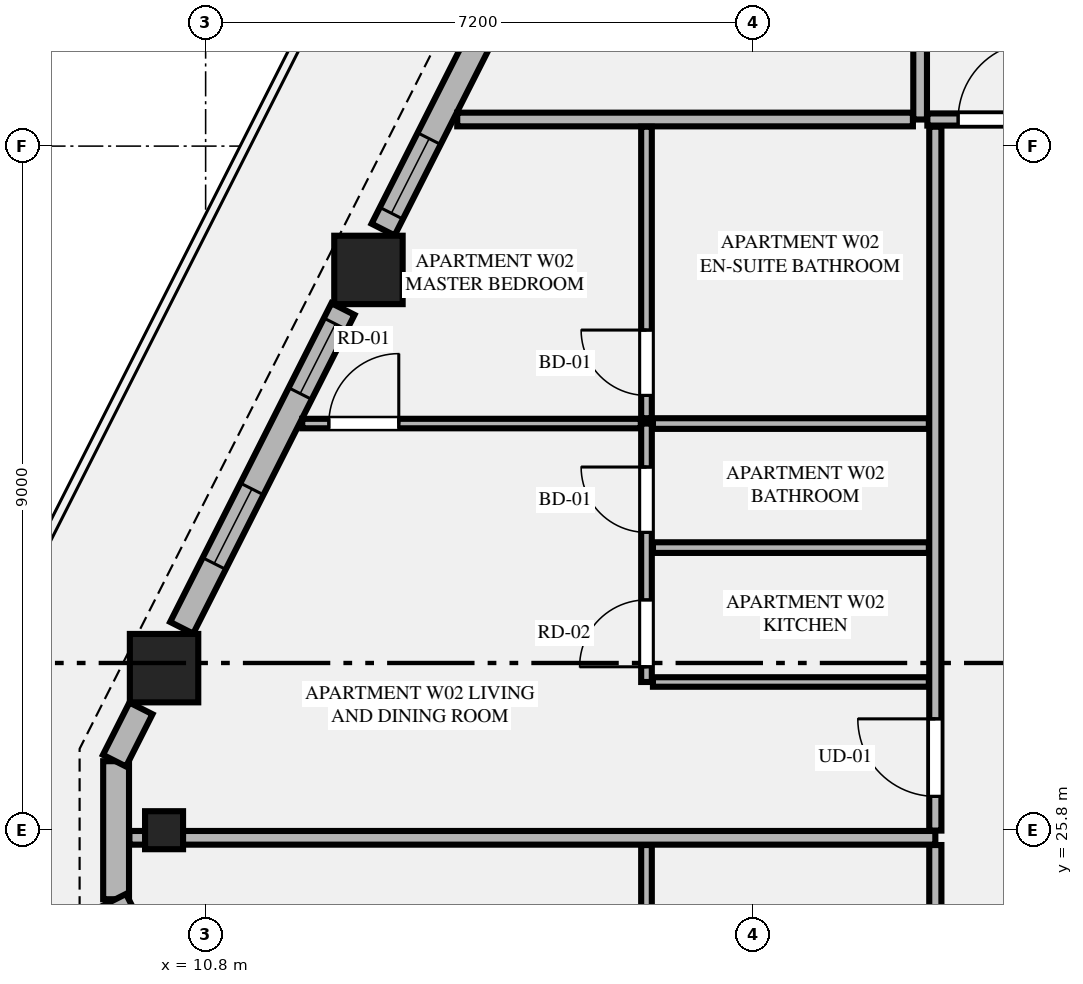
"""IFC4 building model, lengths in metres.
Left out: names, types, materials, properties, quantities, classifications, styles, units other than length and angle.
Written with IfcOpenShell. Run it as: python <this file> out.ifc"""

import sys

from ifc_helpers import new_model, si_unit, direction, frame, frame_2d, origin, origin_2d, place, context, subcontext, project, spatial, rectangle, extrude, element, fill, save


model = new_model("IFC4")
c1 = context("Model", 3, precision=1e-05, world=origin(), true_north=direction((0.0, 1.0)))
c2 = subcontext(c1, "Body", "Model", "MODEL_VIEW")
j1 = project(units=[si_unit("LENGTHUNIT", "METRE"), si_unit("PLANEANGLEUNIT", "RADIAN")], contexts=[c1])
p1 = place(None, origin())
s1 = spatial("IfcSite", under=j1, at=p1, CompositionType="ELEMENT")
p2 = place(p1, origin())
s2 = spatial("IfcBuilding", under=s1, at=p2, CompositionType="ELEMENT")
p3 = place(p2, frame((0.0, 0.0, 171.9)))
s3 = spatial("IfcBuildingStorey", under=s2, at=p3, CompositionType="ELEMENT", Elevation=171.9)
for number, where, z_axis, x_axis in (
    (1, (12.942, 33.171, 0.0), (0.0, 0.0, 1.0), (1.0, 0.0, 0.0)),
    (2, (10.253, 27.932, 0.0), (0.0, 0.0, 1.0), (1.0, 0.0, 0.0)),
):
    element("IfcColumn", number, at=place(p3, frame(where, z_axis=z_axis, x_axis=x_axis)), inside=s3, PredefinedType="COLUMN", context=c2, shape_type="SweptSolid", body=[
        extrude(rectangle(XDim=0.9, YDim=0.9, at=origin_2d()), origin(), (0.0, 0.0, 1.0), 3.55),
    ])
p4 = place(p3, frame((10.253, 25.8, 0.0), z_axis=(0.0, 0.0, 1.0), x_axis=(0.0, -1.0, 0.0)))
e3 = element("IfcColumn", 3, at=p4, inside=s3, PredefinedType="PILASTER", context=c2, shape_type="SweptSolid", body=[
    extrude(rectangle(XDim=0.5, YDim=0.35, at=origin_2d()), origin(), (0.0, 0.0, 1.0), 3.55),
])
p5 = place(p3, frame((9.622, 26.708, 0.0), z_axis=(0.0, 0.0, 1.0), x_axis=(0.0, -1.0, 0.0)))
e4 = element("IfcWall", 4, at=p5, inside=s3, PredefinedType="STANDARD", context=c2, shape_type="SweptSolid", body=[
    extrude(rectangle(XDim=1.816, YDim=0.34, at=frame_2d((0.908, 0.0))), origin(), (0.0, 0.0, 1.0), 3.35),
])
p6 = place(p3, frame((15.352, 38.083, 0.0), z_axis=(0.0, 0.0, 1.0), x_axis=(-0.451524246964, -0.89225884944, 0.0)))
e5 = element("IfcWall", 5, at=p6, inside=s3, PredefinedType="STANDARD", context=c2, shape_type="SweptSolid", body=[
    extrude(rectangle(XDim=4.91, YDim=0.34, at=frame_2d((2.455, 0.0))), origin(), (0.0, 0.0, 1.0), 2.883),
])
p7 = place(p6, frame((0.963, 0.0, 0.75)))
e6 = element("IfcOpeningElement", 6, at=p7, cuts=e5, PredefinedType="OPENING", context=c2, shape_type="SweptSolid", body=[
    extrude(rectangle(XDim=1.1, YDim=1.983, at=frame_2d((0.55, 0.991))), frame((0.0, 0.18, 0.0), z_axis=(0.0, -1.0, 0.0), x_axis=(1.0, 0.0, 0.0)), (0.0, 0.0, 1.0), 0.36),
])
p8 = place(p6, frame((3.569, 0.0, 0.75)))
e7 = element("IfcOpeningElement", 7, at=p8, cuts=e5, PredefinedType="OPENING", context=c2, shape_type="SweptSolid", body=[
    extrude(rectangle(XDim=1.1, YDim=1.983, at=frame_2d((0.55, 0.991))), frame((0.0, 0.18, 0.0), z_axis=(0.0, -1.0, 0.0), x_axis=(1.0, 0.0, 0.0)), (0.0, 0.0, 1.0), 0.36),
])
p9 = place(p3, frame((12.607, 32.657, 0.0), z_axis=(0.0, 0.0, 1.0), x_axis=(-0.451426298588, -0.892308409096, 0.0)))
e8 = element("IfcWall", 8, at=p9, inside=s3, PredefinedType="STANDARD", context=c2, shape_type="SweptSolid", body=[
    extrude(rectangle(XDim=4.7, YDim=0.34, at=frame_2d((2.35, 0.0))), origin(), (0.0, 0.0, 1.0), 2.883),
])
p10 = place(p9, frame((0.22, 0.0, 0.75)))
e9 = element("IfcOpeningElement", 9, at=p10, cuts=e8, PredefinedType="OPENING", context=c2, shape_type="SweptSolid", body=[
    extrude(rectangle(XDim=1.027, YDim=1.983, at=frame_2d((0.514, 0.991))), frame((0.0, 0.18, 0.0), z_axis=(0.0, -1.0, 0.0), x_axis=(1.0, 0.0, 0.0)), (0.0, 0.0, 1.0), 0.36),
])
p11 = place(p9, frame((2.653, 0.0, 0.75)))
e10 = element("IfcOpeningElement", 10, at=p11, cuts=e8, PredefinedType="OPENING", context=c2, shape_type="SweptSolid", body=[
    extrude(rectangle(XDim=1.1, YDim=1.983, at=frame_2d((0.55, 0.991))), frame((0.0, 0.18, 0.0), z_axis=(0.0, -1.0, 0.0), x_axis=(1.0, 0.0, 0.0)), (0.0, 0.0, 1.0), 0.36),
])
for number, where, z_axis, x_axis in (
    (11, (9.949, 27.403, 0.0), (0.0, 0.0, 1.0), (-0.451, -0.892, 0.0)),
    (12, (9.601, 24.885, 0.0), (0.0, 0.0, 1.0), (0.451, -0.892, 0.0)),
):
    element("IfcWall", number, at=place(p3, frame(where, z_axis=z_axis, x_axis=x_axis)), inside=s3, PredefinedType="STANDARD", context=c2, shape_type="SweptSolid", body=[
        extrude(rectangle(XDim=0.771, YDim=0.34, at=frame_2d((0.385, 0.0))), origin(), (0.0, 0.0, 1.0), 3.35),
    ])
p12 = place(p3, frame((20.2, 35.15, 0.0), z_axis=(0.0, 0.0, 1.0), x_axis=(0.0, 1.0, 0.0)))
e13 = element("IfcWall", 13, at=p12, inside=s3, PredefinedType="PARTITIONING", context=c2, shape_type="SweptSolid", body=[
    extrude(rectangle(XDim=10.482, YDim=0.18, at=frame_2d((5.241, 0.0))), origin(), (0.0, 0.0, 1.0), 3.35),
])
p13 = place(p3, frame((20.295, 35.15, 0.0), z_axis=(0.0, 0.0, 1.0), x_axis=(1.0, 0.0, 0.0)))
e14 = element("IfcWall", 14, at=p13, inside=s3, PredefinedType="PARTITIONING", context=c2, shape_type="SweptSolid", body=[
    extrude(rectangle(XDim=15.553, YDim=0.16, at=frame_2d((7.776, 0.0))), origin(), (0.0, 0.0, 1.0), 3.35),
])
p14 = place(p13, frame((0.405, 0.0, 0.0)))
e15 = element("IfcOpeningElement", 15, at=p14, cuts=e14, PredefinedType="OPENING", context=c2, shape_type="SweptSolid", body=[
    extrude(rectangle(XDim=1.02, YDim=2.25, at=frame_2d((0.51, 1.125))), frame((0.0, 0.09, 0.0), z_axis=(0.0, -1.0, 0.0), x_axis=(1.0, 0.0, 0.0)), (0.0, 0.0, 1.0), 0.18),
])
p15 = place(p3, frame((14.11, 35.15, 0.0), z_axis=(0.0, 0.0, 1.0), x_axis=(1.0, 0.0, 0.0)))
e16 = element("IfcWall", 16, at=p15, inside=s3, PredefinedType="PARTITIONING", context=c2, shape_type="SweptSolid", body=[
    extrude(rectangle(XDim=5.995, YDim=0.18, at=frame_2d((2.998, 0.0))), origin(), (0.0, 0.0, 1.0), 3.35),
])
p16 = place(p3, frame((20.4, 16.345, 0.0), z_axis=(0.0, 0.0, 1.0), x_axis=(0.0, 1.0, 0.0)))
e17 = element("IfcWall", 17, at=p16, inside=s3, PredefinedType="PARTITIONING", context=c2, shape_type="SweptSolid", body=[
    extrude(rectangle(XDim=9.26, YDim=0.16, at=frame_2d((4.63, 0.0))), origin(), (0.0, 0.0, 1.0), 3.35),
])
p17 = place(p16, frame((0.45, 0.0, 0.0)))
e18 = element("IfcOpeningElement", 18, at=p17, cuts=e17, PredefinedType="OPENING", context=c2, shape_type="SweptSolid", body=[
    extrude(rectangle(XDim=1.02, YDim=2.25, at=frame_2d((0.51, 1.125))), frame((0.0, 0.09, 0.0), z_axis=(0.0, -1.0, 0.0), x_axis=(1.0, 0.0, 0.0)), (0.0, 0.0, 1.0), 0.18),
])
p18 = place(p3, frame((16.6, 21.77, 0.0), z_axis=(0.0, 0.0, 1.0), x_axis=(0.0, 1.0, 0.0)))
e19 = element("IfcWall", 19, at=p18, inside=s3, PredefinedType="PLUMBINGWALL", context=c2, shape_type="SweptSolid", body=[
    extrude(rectangle(XDim=3.835, YDim=0.14, at=frame_2d((1.917, 0.0))), origin(), (0.0, 0.0, 1.0), 3.35),
])
p19 = place(p18, frame((0.3, 0.0, 0.0)))
e20 = element("IfcOpeningElement", 20, at=p19, cuts=e19, PredefinedType="OPENING", context=c2, shape_type="SweptSolid", body=[
    extrude(rectangle(XDim=0.86, YDim=2.1, at=frame_2d((0.43, 1.05))), frame((0.0, 0.08, 0.0), z_axis=(0.0, -1.0, 0.0), x_axis=(1.0, 0.0, 0.0)), (0.0, 0.0, 1.0), 0.16),
])
p20 = place(p3, frame((9.797, 25.7, 0.0), z_axis=(0.0, 0.0, 1.0), x_axis=(1.0, 0.0, 0.0)))
e21 = element("IfcWall", 21, at=p20, inside=s3, PredefinedType="PARTITIONING", context=c2, shape_type="SweptSolid", body=[
    extrude(rectangle(XDim=10.603, YDim=0.18, at=frame_2d((5.301, 0.0))), origin(), (0.0, 0.0, 1.0), 3.35),
])
p21 = place(p3, frame((20.4, 25.795, 0.0), z_axis=(0.0, 0.0, 1.0), x_axis=(0.0, 1.0, 0.0)))
e22 = element("IfcWall", 22, at=p21, inside=s3, PredefinedType="PARTITIONING", context=c2, shape_type="SweptSolid", body=[
    extrude(rectangle(XDim=9.26, YDim=0.16, at=frame_2d((4.63, 0.0))), origin(), (0.0, 0.0, 1.0), 3.35),
])
p22 = place(p21, frame((0.45, 0.0, 0.0)))
e23 = element("IfcOpeningElement", 23, at=p22, cuts=e22, PredefinedType="OPENING", context=c2, shape_type="SweptSolid", body=[
    extrude(rectangle(XDim=1.02, YDim=2.25, at=frame_2d((0.51, 1.125))), frame((0.0, 0.09, 0.0), z_axis=(0.0, -1.0, 0.0), x_axis=(1.0, 0.0, 0.0)), (0.0, 0.0, 1.0), 0.18),
])
p23 = place(p3, frame((16.685, 27.75, 0.0), z_axis=(0.0, 0.0, 1.0), x_axis=(1.0, 0.0, 0.0)))
e24 = element("IfcWall", 24, at=p23, inside=s3, PredefinedType="PARTITIONING", context=c2, shape_type="SweptSolid", body=[
    extrude(rectangle(XDim=3.63, YDim=0.125, at=frame_2d((1.815, 0.0))), origin(), (0.0, 0.0, 1.0), 3.35),
])
p24 = place(p3, frame((16.6, 27.75, 0.0), z_axis=(0.0, 0.0, 1.0), x_axis=(0.0, 1.0, 0.0)))
e25 = element("IfcWall", 25, at=p24, inside=s3, PredefinedType="PLUMBINGWALL", context=c2, shape_type="SweptSolid", body=[
    extrude(rectangle(XDim=3.4, YDim=0.14, at=frame_2d((1.7, 0.0))), origin(), (0.0, 0.0, 1.0), 3.35),
])
p25 = place(p24, frame((0.2, 0.0, 0.0)))
e26 = element("IfcOpeningElement", 26, at=p25, cuts=e25, PredefinedType="OPENING", context=c2, shape_type="SweptSolid", body=[
    extrude(rectangle(XDim=0.88, YDim=2.15, at=frame_2d((0.44, 1.075))), frame((0.0, 0.08, 0.0), z_axis=(0.0, -1.0, 0.0), x_axis=(1.0, 0.0, 0.0)), (0.0, 0.0, 1.0), 0.16),
])
p26 = place(p24, frame((1.968, 0.0, 0.0)))
e27 = element("IfcOpeningElement", 27, at=p26, cuts=e25, PredefinedType="OPENING", context=c2, shape_type="SweptSolid", body=[
    extrude(rectangle(XDim=0.86, YDim=2.1, at=frame_2d((0.43, 1.05))), frame((0.0, 0.08, 0.0), z_axis=(0.0, -1.0, 0.0), x_axis=(1.0, 0.0, 0.0)), (0.0, 0.0, 1.0), 0.16),
])
p27 = place(p3, frame((16.6, 31.22, 0.0), z_axis=(0.0, 0.0, 1.0), x_axis=(0.0, 1.0, 0.0)))
e28 = element("IfcWall", 28, at=p27, inside=s3, PredefinedType="PLUMBINGWALL", context=c2, shape_type="SweptSolid", body=[
    extrude(rectangle(XDim=3.835, YDim=0.14, at=frame_2d((1.917, 0.0))), origin(), (0.0, 0.0, 1.0), 3.35),
])
p28 = place(p27, frame((0.3, 0.0, 0.0)))
e29 = element("IfcOpeningElement", 29, at=p28, cuts=e28, PredefinedType="OPENING", context=c2, shape_type="SweptSolid", body=[
    extrude(rectangle(XDim=0.86, YDim=2.1, at=frame_2d((0.43, 1.05))), frame((0.0, 0.08, 0.0), z_axis=(0.0, -1.0, 0.0), x_axis=(1.0, 0.0, 0.0)), (0.0, 0.0, 1.0), 0.16),
])
p29 = place(p3, frame((16.685, 31.15, 0.0), z_axis=(0.0, 0.0, 1.0), x_axis=(1.0, 0.0, 0.0)))
e30 = element("IfcWall", 30, at=p29, inside=s3, PredefinedType="PLUMBINGWALL", context=c2, shape_type="SweptSolid", body=[
    extrude(rectangle(XDim=3.63, YDim=0.14, at=frame_2d((1.815, 0.0))), origin(), (0.0, 0.0, 1.0), 3.35),
])
p30 = place(p3, frame((12.071, 31.15, 0.0), z_axis=(0.0, 0.0, 1.0), x_axis=(1.0, 0.0, 0.0)))
e31 = element("IfcWall", 31, at=p30, inside=s3, PredefinedType="PARTITIONING", context=c2, shape_type="SweptSolid", body=[
    extrude(rectangle(XDim=4.454, YDim=0.125, at=frame_2d((2.227, 0.0))), origin(), (0.0, 0.0, 1.0), 3.35),
])
p31 = place(p30, frame((0.35, 0.0, 0.0)))
e32 = element("IfcOpeningElement", 32, at=p31, cuts=e31, PredefinedType="OPENING", context=c2, shape_type="SweptSolid", body=[
    extrude(rectangle(XDim=0.92, YDim=2.15, at=frame_2d((0.46, 1.075))), frame((0.0, 0.073, 0.0), z_axis=(0.0, -1.0, 0.0), x_axis=(1.0, 0.0, 0.0)), (0.0, 0.0, 1.0), 0.145),
])
p32 = place(p3, frame((16.685, 29.518, 0.0), z_axis=(0.0, 0.0, 1.0), x_axis=(1.0, 0.0, 0.0)))
e33 = element("IfcWall", 33, at=p32, inside=s3, PredefinedType="PLUMBINGWALL", context=c2, shape_type="SweptSolid", body=[
    extrude(rectangle(XDim=3.63, YDim=0.14, at=frame_2d((1.815, 0.0))), origin(), (0.0, 0.0, 1.0), 3.35),
])
p33 = place(p10, origin())
e34 = element("IfcWindow", 34, at=p33, inside=s3, PartitioningType="SINGLE_PANEL", PredefinedType="WINDOW", context=c2, shape_type="SweptSolid", body=[
    extrude(rectangle(XDim=1.027, YDim=1.983, at=frame_2d((0.514, 0.991))), frame((0.0, 0.03, 0.0), z_axis=(0.0, -1.0, 0.0), x_axis=(1.0, 0.0, 0.0)), (0.0, 0.0, 1.0), 0.06),
])
fill(e9, e34)
p34 = place(p14, origin())
e35 = element("IfcDoor", 35, at=p34, inside=s3, OperationType="SINGLE_SWING_RIGHT", PredefinedType="DOOR", context=c2, shape_type="SweptSolid", body=[
    extrude(rectangle(XDim=1.02, YDim=2.25, at=frame_2d((0.51, 1.125))), frame((0.0, 0.025, 0.0), z_axis=(0.0, -1.0, 0.0), x_axis=(1.0, 0.0, 0.0)), (0.0, 0.0, 1.0), 0.05),
])
fill(e15, e35)
p35 = place(p25, origin())
e36 = element("IfcDoor", 36, at=p35, inside=s3, OperationType="SINGLE_SWING_LEFT", PredefinedType="DOOR", context=c2, shape_type="SweptSolid", body=[
    extrude(rectangle(XDim=0.88, YDim=2.15, at=frame_2d((0.44, 1.075))), frame((0.0, 0.025, 0.0), z_axis=(0.0, -1.0, 0.0), x_axis=(1.0, 0.0, 0.0)), (0.0, 0.0, 1.0), 0.05),
])
fill(e26, e36)
p36 = place(p26, origin())
e37 = element("IfcDoor", 37, at=p36, inside=s3, OperationType="SINGLE_SWING_RIGHT", PredefinedType="DOOR", context=c2, shape_type="SweptSolid", body=[
    extrude(rectangle(XDim=0.86, YDim=2.1, at=frame_2d((0.43, 1.05))), frame((0.0, 0.025, 0.0), z_axis=(0.0, -1.0, 0.0), x_axis=(1.0, 0.0, 0.0)), (0.0, 0.0, 1.0), 0.05),
])
fill(e27, e37)
p37 = place(p28, origin())
e38 = element("IfcDoor", 38, at=p37, inside=s3, OperationType="SINGLE_SWING_RIGHT", PredefinedType="DOOR", context=c2, shape_type="SweptSolid", body=[
    extrude(rectangle(XDim=0.86, YDim=2.1, at=frame_2d((0.43, 1.05))), frame((0.0, 0.025, 0.0), z_axis=(0.0, -1.0, 0.0), x_axis=(1.0, 0.0, 0.0)), (0.0, 0.0, 1.0), 0.05),
])
fill(e29, e38)
p38 = place(p22, origin())
e39 = element("IfcDoor", 39, at=p38, inside=s3, OperationType="SINGLE_SWING_RIGHT", PredefinedType="DOOR", context=c2, shape_type="SweptSolid", body=[
    extrude(rectangle(XDim=1.02, YDim=2.25, at=frame_2d((0.51, 1.125))), frame((0.0, 0.025, 0.0), z_axis=(0.0, -1.0, 0.0), x_axis=(1.0, 0.0, 0.0)), (0.0, 0.0, 1.0), 0.05),
])
fill(e23, e39)
p39 = place(p31, origin())
e40 = element("IfcDoor", 40, at=p39, inside=s3, OperationType="SINGLE_SWING_RIGHT", PredefinedType="DOOR", context=c2, shape_type="SweptSolid", body=[
    extrude(rectangle(XDim=0.92, YDim=2.15, at=frame_2d((0.46, 1.075))), frame((0.0, 0.025, 0.0), z_axis=(0.0, -1.0, 0.0), x_axis=(1.0, 0.0, 0.0)), (0.0, 0.0, 1.0), 0.05),
])
fill(e32, e40)
p40 = place(p8, origin())
e41 = element("IfcWindow", 41, at=p40, inside=s3, PartitioningType="SINGLE_PANEL", PredefinedType="WINDOW", context=c2, shape_type="SweptSolid", body=[
    extrude(rectangle(XDim=1.1, YDim=1.983, at=frame_2d((0.55, 0.991))), frame((0.0, 0.03, 0.0), z_axis=(0.0, -1.0, 0.0), x_axis=(1.0, 0.0, 0.0)), (0.0, 0.0, 1.0), 0.06),
])
fill(e7, e41)
p41 = place(p11, origin())
e42 = element("IfcWindow", 42, at=p41, inside=s3, PartitioningType="SINGLE_PANEL", PredefinedType="WINDOW", context=c2, shape_type="SweptSolid", body=[
    extrude(rectangle(XDim=1.1, YDim=1.983, at=frame_2d((0.55, 0.991))), frame((0.0, 0.03, 0.0), z_axis=(0.0, -1.0, 0.0), x_axis=(1.0, 0.0, 0.0)), (0.0, 0.0, 1.0), 0.06),
])
fill(e10, e42)
save(model, sys.argv[1])
